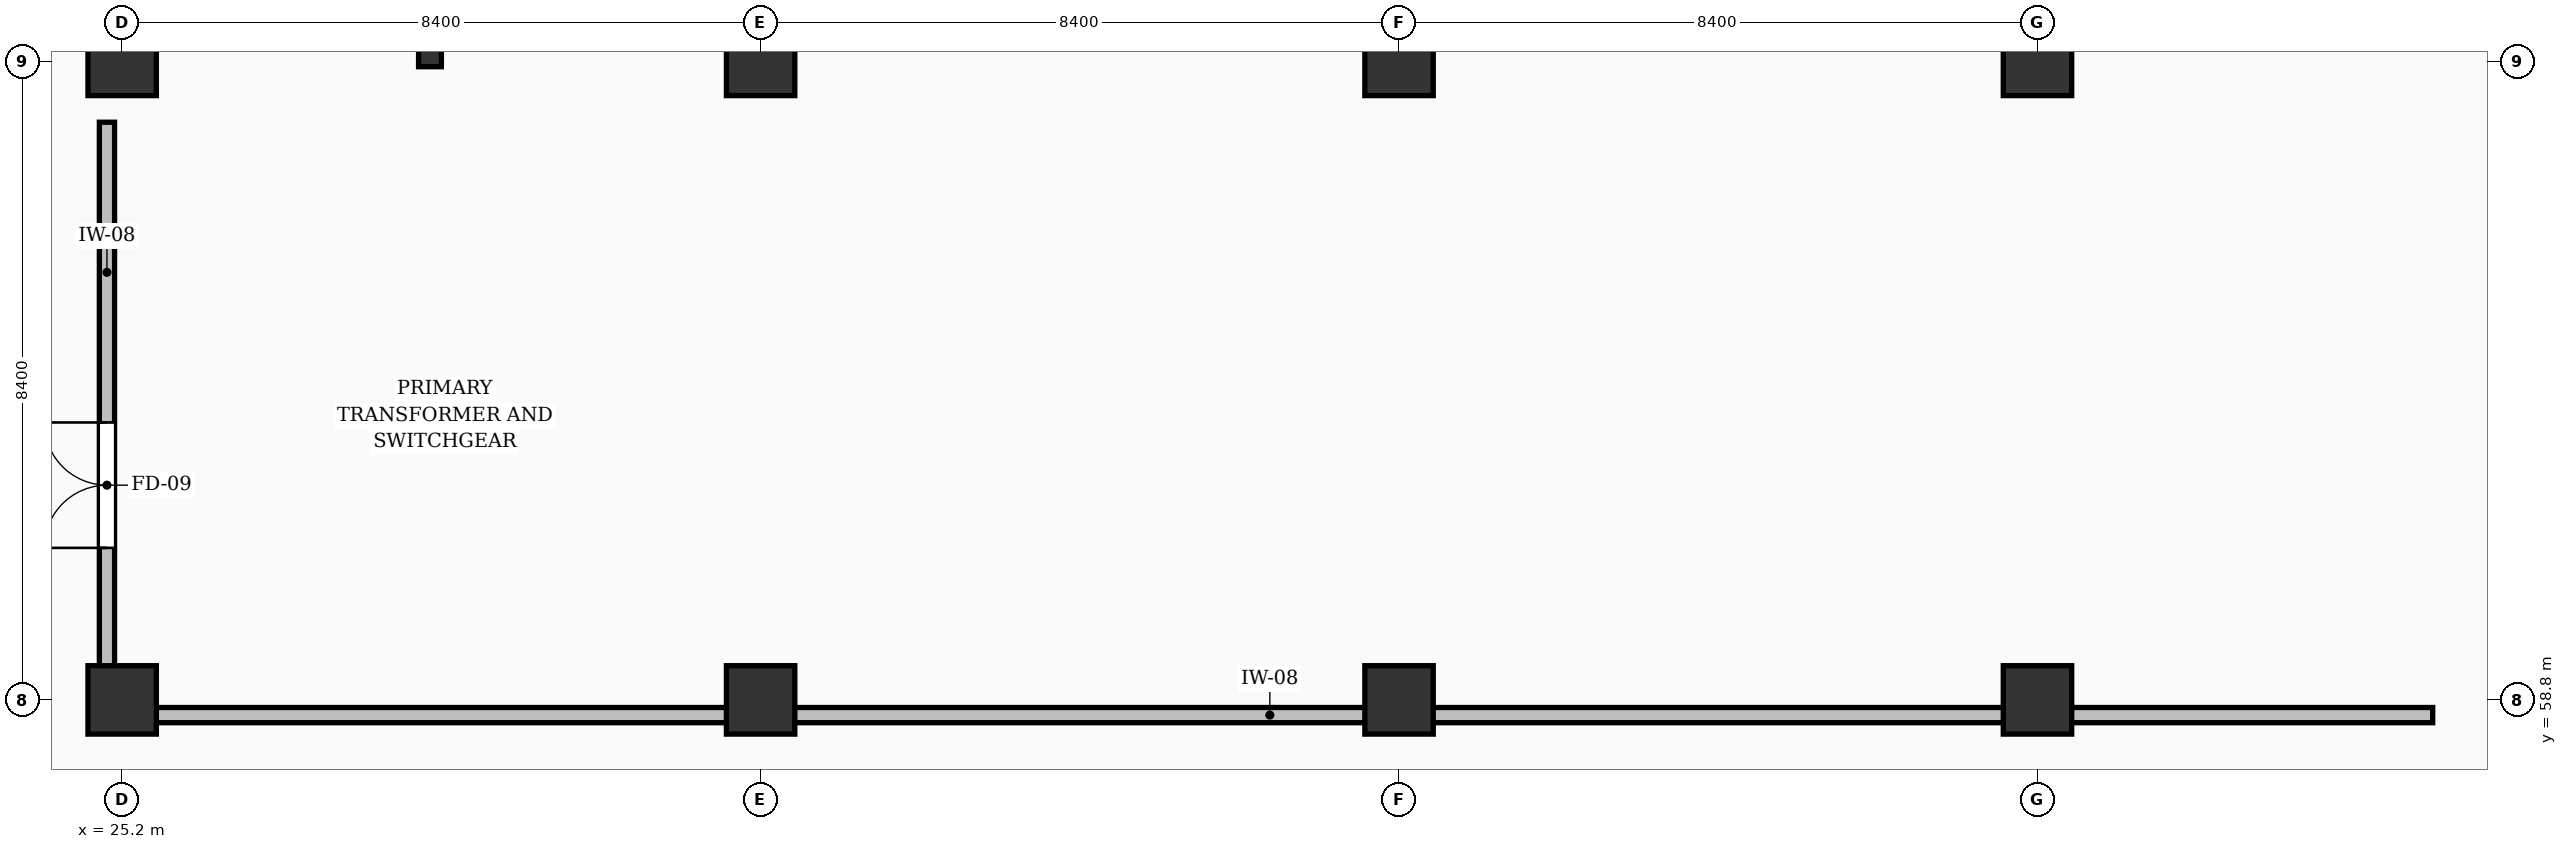
"""IFC4 building model, lengths in metres.
Left out: names, types, materials, properties, quantities, classifications, styles, units other than length and angle.
Written with IfcOpenShell. Run it as: python <this file> out.ifc"""

import sys

from ifc_helpers import new_model, si_unit, direction, frame, frame_2d, origin, origin_2d, place, context, subcontext, project, spatial, rectangle, hollow_rectangle, extrude, element, fill, save


model = new_model("IFC4")
c1 = context("Model", 3, precision=1e-05, world=origin(), true_north=direction((0.0, 1.0)))
c2 = subcontext(c1, "Body", "Model", "MODEL_VIEW")
j1 = project(units=[si_unit("LENGTHUNIT", "METRE"), si_unit("PLANEANGLEUNIT", "RADIAN")], contexts=[c1])
p1 = place(None, origin())
s1 = spatial("IfcSite", under=j1, at=p1, CompositionType="ELEMENT")
p2 = place(p1, origin())
s2 = spatial("IfcBuilding", under=s1, at=p2, CompositionType="ELEMENT")
p3 = place(p2, frame((0.0, 0.0, -4.2)))
s3 = spatial("IfcBuildingStorey", under=s2, at=p3, CompositionType="ELEMENT", Elevation=-4.2)
for number, where, z_axis, x_axis in (
    (1, (25.2, 58.8, 0.0), (0.0, 0.0, 1.0), (1.0, 0.0, 0.0)),
    (2, (25.2, 67.2, 0.0), (0.0, 0.0, 1.0), (1.0, 0.0, 0.0)),
    (3, (33.6, 58.8, 0.0), (0.0, 0.0, 1.0), (1.0, 0.0, 0.0)),
    (4, (33.6, 67.2, 0.0), (0.0, 0.0, 1.0), (1.0, 0.0, 0.0)),
    (5, (42.0, 58.8, 0.0), (0.0, 0.0, 1.0), (1.0, 0.0, 0.0)),
    (6, (42.0, 67.2, 0.0), (0.0, 0.0, 1.0), (1.0, 0.0, 0.0)),
    (7, (50.4, 58.8, 0.0), (0.0, 0.0, 1.0), (1.0, 0.0, 0.0)),
    (8, (50.4, 67.2, 0.0), (0.0, 0.0, 1.0), (1.0, 0.0, 0.0)),
):
    element("IfcColumn", number, at=place(p3, frame(where, z_axis=z_axis, x_axis=x_axis)), inside=s3, PredefinedType="COLUMN", context=c2, shape_type="SweptSolid", body=[
        extrude(rectangle(XDim=0.9, YDim=0.9, at=origin_2d()), origin(), (0.0, 0.0, 1.0), 4.2),
    ])
p4 = place(p3, frame((29.25, 67.28, 0.0), z_axis=(0.0, 0.0, 1.0), x_axis=(1.0, 0.0, 0.0)))
e9 = element("IfcColumn", 9, at=p4, inside=s3, PredefinedType="COLUMN", context=c2, shape_type="SweptSolid", body=[
    extrude(hollow_rectangle(XDim=0.3, YDim=0.3, WallThickness=0.016, at=origin_2d()), origin(), (0.0, 0.0, 1.0), 4.2),
])
p5 = place(p3, frame((25.0, 58.6, 0.0), z_axis=(0.0, 0.0, 1.0), x_axis=(0.0, 1.0, 0.0)))
e10 = element("IfcWall", 10, at=p5, inside=s3, PredefinedType="SOLIDWALL", context=c2, shape_type="SweptSolid", body=[
    extrude(rectangle(XDim=7.8, YDim=0.2, at=frame_2d((3.9, 0.0))), origin(), (0.0, 0.0, 1.0), 2.885),
])
p6 = place(p5, frame((2.2, 0.0, 0.0)))
e11 = element("IfcOpeningElement", 11, at=p6, cuts=e10, PredefinedType="OPENING", context=c2, shape_type="SweptSolid", body=[
    extrude(rectangle(XDim=1.65, YDim=2.25, at=frame_2d((0.825, 1.125))), frame((0.0, 0.11, 0.0), z_axis=(0.0, -1.0, 0.0), x_axis=(1.0, 0.0, 0.0)), (0.0, 0.0, 1.0), 0.22),
])
p7 = place(p3, frame((25.0, 58.6, 0.0), z_axis=(0.0, 0.0, 1.0), x_axis=(1.0, 0.0, 0.0)))
e12 = element("IfcWall", 12, at=p7, inside=s3, PredefinedType="SOLIDWALL", context=c2, shape_type="SweptSolid", body=[
    extrude(rectangle(XDim=30.6, YDim=0.2, at=frame_2d((15.3, 0.0))), origin(), (0.0, 0.0, 1.0), 2.98),
])
p8 = place(p6, origin())
e13 = element("IfcDoor", 13, at=p8, inside=s3, OperationType="DOUBLE_DOOR_SINGLE_SWING", PredefinedType="DOOR", context=c2, shape_type="SweptSolid", body=[
    extrude(rectangle(XDim=1.65, YDim=2.25, at=frame_2d((0.825, 1.125))), frame((0.0, 0.025, 0.0), z_axis=(0.0, -1.0, 0.0), x_axis=(1.0, 0.0, 0.0)), (0.0, 0.0, 1.0), 0.05),
])
fill(e11, e13)
save(model, sys.argv[1])
